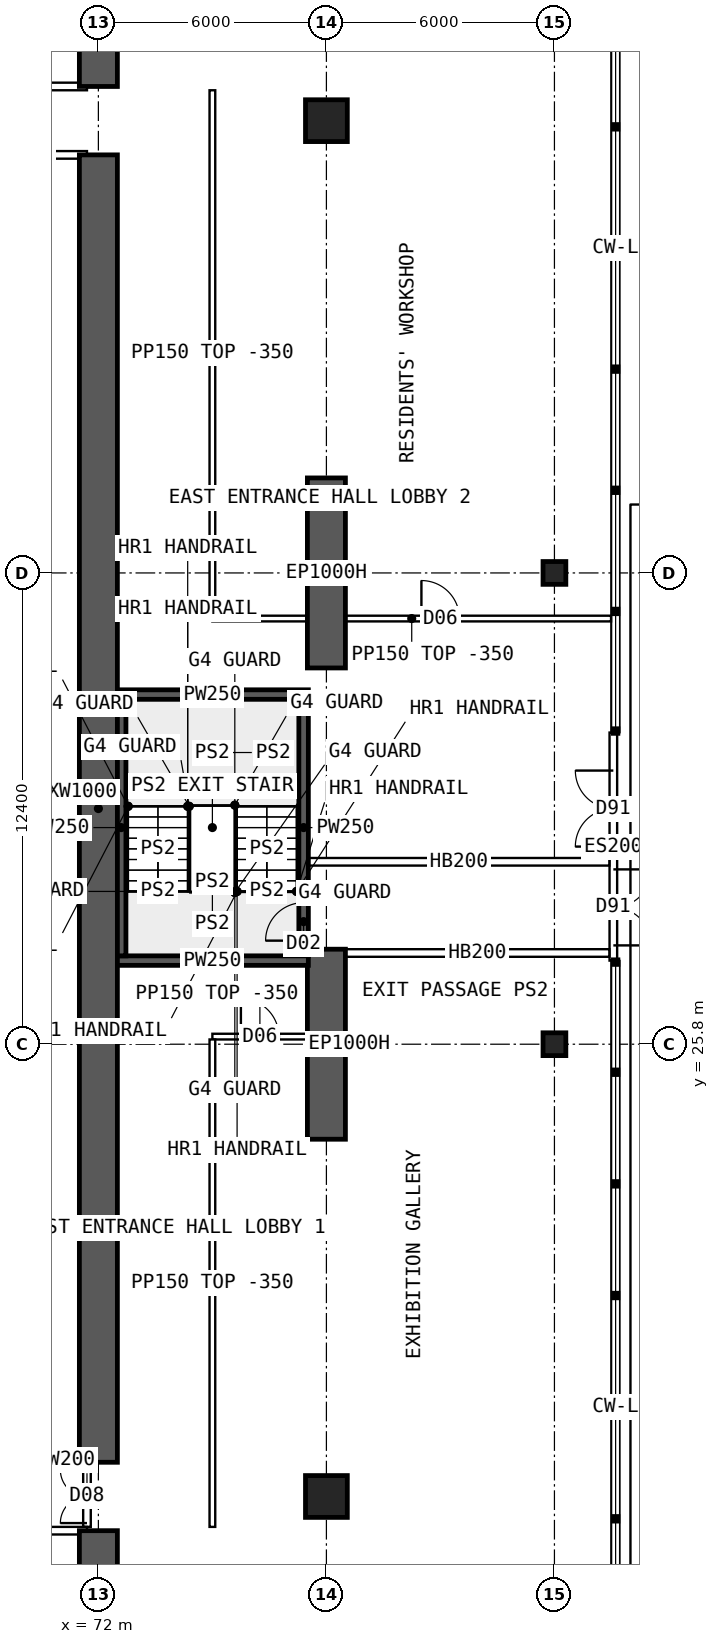
"""IFC4 building model, lengths in metres.
Left out: names, types, materials, properties, quantities, classifications, styles, units other than length and angle.
Written with IfcOpenShell. Run it as: python <this file> out.ifc"""

import sys

from ifc_helpers import new_model, si_unit, direction, frame, frame_2d, origin, origin_2d, place, context, subcontext, project, spatial, polyline, rectangle, hollow_rectangle, outline, extrude, element, fill, save


model = new_model("IFC4")
c1 = context("Model", 3, precision=1e-05, world=origin(), true_north=direction((0.0, 1.0)))
c2 = subcontext(c1, "Body", "Model", "MODEL_VIEW")
j1 = project(units=[si_unit("LENGTHUNIT", "METRE"), si_unit("PLANEANGLEUNIT", "RADIAN")], contexts=[c1])
p1 = place(None, origin())
s1 = spatial("IfcSite", under=j1, at=p1, CompositionType="ELEMENT")
p2 = place(p1, origin())
s2 = spatial("IfcBuilding", under=s1, at=p2, CompositionType="ELEMENT")
p3 = place(p2, origin())
s3 = spatial("IfcBuildingStorey", under=s2, at=p3, CompositionType="ELEMENT", Elevation=0.0)
for number, where, z_axis, x_axis in (
    (1, (78.0, 23.3, 0.0), (0.0, 0.0, 1.0), (0.0, 1.0, 0.0)),
    (2, (78.0, 35.7, 0.0), (0.0, 0.0, 1.0), (0.0, 1.0, 0.0)),
):
    element("IfcWall", number, at=place(p3, frame(where, z_axis=z_axis, x_axis=x_axis)), inside=s3, PredefinedType="SHEAR", context=c2, shape_type="SweptSolid", body=[
        extrude(rectangle(XDim=5.0, YDim=1.0, at=frame_2d((2.5, 0.0))), origin(), (0.0, 0.0, 1.0), 6.0),
    ])
for number, where, z_axis, x_axis in (
    (3, (78.0, 13.9, 0.0), (0.0, 0.0, 1.0), (1.0, 0.0, 0.0)),
    (4, (78.0, 50.1, 0.0), (0.0, 0.0, 1.0), (1.0, 0.0, 0.0)),
):
    element("IfcColumn", number, at=place(p3, frame(where, z_axis=z_axis, x_axis=x_axis)), inside=s3, PredefinedType="COLUMN", context=c2, shape_type="SweptSolid", body=[
        extrude(hollow_rectangle(XDim=1.1, YDim=1.1, WallThickness=0.11, at=origin_2d()), origin(), (0.0, 0.0, 1.0), 6.0),
    ])
for number, where, z_axis, x_axis in (
    (5, (84.0, 25.8, 0.0), (0.0, 0.0, 1.0), (1.0, 0.0, 0.0)),
    (6, (84.0, 38.2, 0.0), (0.0, 0.0, 1.0), (1.0, 0.0, 0.0)),
):
    element("IfcColumn", number, at=place(p3, frame(where, z_axis=z_axis, x_axis=x_axis)), inside=s3, PredefinedType="COLUMN", context=c2, shape_type="SweptSolid", body=[
        extrude(hollow_rectangle(XDim=0.6, YDim=0.6, WallThickness=0.06, at=origin_2d()), origin(), (0.0, 0.0, 1.0), 6.0),
    ])
p4 = place(p3, frame((72.475, 28.0, 0.0), z_axis=(0.0, 0.0, 1.0), x_axis=(1.0, 0.0, 0.0)))
e7 = element("IfcWall", 7, at=p4, inside=s3, PredefinedType="SHEAR", context=c2, shape_type="SweptSolid", body=[
    extrude(rectangle(XDim=5.05, YDim=0.25, at=frame_2d((2.525, 0.0))), origin(), (0.0, 0.0, 1.0), 6.0),
])
p5 = place(p3, frame((77.4, 28.125, 0.0), z_axis=(0.0, 0.0, 1.0), x_axis=(0.0, 1.0, 0.0)))
e8 = element("IfcWall", 8, at=p5, inside=s3, PredefinedType="SHEAR", context=c2, shape_type="SweptSolid", body=[
    extrude(rectangle(XDim=6.75, YDim=0.25, at=frame_2d((3.375, 0.0))), origin(), (0.0, 0.0, 1.0), 6.0),
])
p6 = place(p5, frame((0.4, 0.0, 0.0)))
e9 = element("IfcOpeningElement", 9, at=p6, cuts=e8, PredefinedType="OPENING", context=c2, shape_type="SweptSolid", body=[
    extrude(rectangle(XDim=1.0, YDim=2.1, at=frame_2d((0.5, 1.05))), frame((0.0, 0.135, 0.0), z_axis=(0.0, -1.0, 0.0), x_axis=(1.0, 0.0, 0.0)), (0.0, 0.0, 1.0), 0.27),
])
p7 = place(p3, frame((77.525, 35.0, 0.0), z_axis=(0.0, 0.0, 1.0), x_axis=(-1.0, 0.0, 0.0)))
e10 = element("IfcWall", 10, at=p7, inside=s3, PredefinedType="SHEAR", context=c2, shape_type="SweptSolid", body=[
    extrude(rectangle(XDim=5.05, YDim=0.25, at=frame_2d((2.525, 0.0))), origin(), (0.0, 0.0, 1.0), 6.0),
])
p8 = place(p3, frame((72.6, 34.875, 0.0), z_axis=(0.0, 0.0, 1.0), x_axis=(0.0, -1.0, 0.0)))
e11 = element("IfcWall", 11, at=p8, inside=s3, PredefinedType="SHEAR", context=c2, shape_type="SweptSolid", body=[
    extrude(rectangle(XDim=6.75, YDim=0.25, at=frame_2d((3.375, 0.0))), origin(), (0.0, 0.0, 1.0), 6.0),
])
for number, where, z_axis, x_axis in (
    (12, (72.0, 7.7, 0.0), (0.0, 0.0, 1.0), (0.0, 1.0, 0.0)),
    (13, (72.0, 51.0, 0.0), (0.0, 0.0, 1.0), (0.0, 1.0, 0.0)),
):
    element("IfcWall", number, at=place(p3, frame(where, z_axis=z_axis, x_axis=x_axis)), inside=s3, PredefinedType="SHEAR", context=c2, shape_type="SweptSolid", body=[
        extrude(rectangle(XDim=5.3, YDim=1.0, at=frame_2d((2.65, 0.0))), origin(), (0.0, 0.0, 1.0), 6.0),
    ])
p9 = place(p3, frame((72.0, 14.8, 0.0), z_axis=(0.0, 0.0, 1.0), x_axis=(0.0, 1.0, 0.0)))
e14 = element("IfcWall", 14, at=p9, inside=s3, PredefinedType="SHEAR", context=c2, shape_type="SweptSolid", body=[
    extrude(rectangle(XDim=34.4, YDim=1.0, at=frame_2d((17.2, 0.0))), origin(), (0.0, 0.0, 1.0), 6.0),
])
p10 = place(p3, frame((85.55, 28.0, 0.0), z_axis=(0.0, 0.0, 1.0), x_axis=(0.0, 1.0, 0.0)))
e15 = element("IfcWall", 15, at=p10, inside=s3, PredefinedType="SOLIDWALL", context=c2, shape_type="SweptSolid", body=[
    extrude(rectangle(XDim=6.0, YDim=0.2, at=frame_2d((3.0, 0.0))), origin(), (0.0, 0.0, 1.0), 5.65),
])
p11 = place(p10, frame((3.0, 0.0, 0.0)))
e16 = element("IfcOpeningElement", 16, at=p11, cuts=e15, PredefinedType="OPENING", context=c2, shape_type="SweptSolid", body=[
    extrude(rectangle(XDim=2.0, YDim=2.4, at=frame_2d((1.0, 1.2))), frame((0.0, 0.11, 0.0), z_axis=(0.0, -1.0, 0.0), x_axis=(1.0, 0.0, 0.0)), (0.0, 0.0, 1.0), 0.22),
])
p12 = place(p10, frame((0.4, 0.0, 0.0)))
e17 = element("IfcOpeningElement", 17, at=p12, cuts=e15, PredefinedType="OPENING", context=c2, shape_type="SweptSolid", body=[
    extrude(rectangle(XDim=2.0, YDim=2.4, at=frame_2d((1.0, 1.2))), frame((0.0, 0.11, 0.0), z_axis=(0.0, -1.0, 0.0), x_axis=(1.0, 0.0, 0.0)), (0.0, 0.0, 1.0), 0.22),
])
for number, where, z_axis, x_axis in (
    (18, (66.5, 13.0, 0.0), (0.0, 0.0, 1.0), (1.0, 0.0, 0.0)),
    (19, (66.5, 51.0, 0.0), (0.0, 0.0, 1.0), (1.0, 0.0, 0.0)),
):
    element("IfcWall", number, at=place(p3, frame(where, z_axis=z_axis, x_axis=x_axis)), inside=s3, PredefinedType="SOLIDWALL", context=c2, shape_type="SweptSolid", body=[
        extrude(rectangle(XDim=5.2, YDim=0.2, at=frame_2d((2.6, 0.0))), origin(), (0.0, 0.0, 1.0), 5.65),
    ])
for number, where, z_axis, x_axis in (
    (20, (68.4, 14.8, 0.0), (0.0, 0.0, 1.0), (1.0, 0.0, 0.0)),
    (21, (68.4, 49.2, 0.0), (0.0, 0.0, 1.0), (1.0, 0.0, 0.0)),
):
    element("IfcWall", number, at=place(p3, frame(where, z_axis=z_axis, x_axis=x_axis)), inside=s3, PredefinedType="SOLIDWALL", context=c2, shape_type="SweptSolid", body=[
        extrude(rectangle(XDim=3.3, YDim=0.2, at=frame_2d((1.65, 0.0))), origin(), (0.0, 0.0, 1.0), 5.65),
    ])
p13 = place(p3, frame((78.5, 28.2, 0.0), z_axis=(0.0, 0.0, 1.0), x_axis=(1.0, 0.0, 0.0)))
e22 = element("IfcWall", 22, at=p13, inside=s3, PredefinedType="SOLIDWALL", context=c2, shape_type="SweptSolid", body=[
    extrude(outline(polyline([(0.0, 0.0), (6.945, 0.0), (6.945, 5.65), (5.802, 5.65), (5.8, 5.05), (5.202, 5.05), (5.2, 5.65), (0.0, 5.65), (0.0, 0.0)])), frame((0.0, 0.1, 0.0), z_axis=(0.0, -1.0, 0.0), x_axis=(1.0, 0.0, 0.0)), (0.0, 0.0, 1.0), 0.2),
])
p14 = place(p3, frame((77.525, 30.6, 0.0), z_axis=(0.0, 0.0, 1.0), x_axis=(1.0, 0.0, 0.0)))
e23 = element("IfcWall", 23, at=p14, inside=s3, PredefinedType="SOLIDWALL", context=c2, shape_type="SweptSolid", body=[
    extrude(outline(polyline([(0.0, 0.0), (7.92, 0.0), (7.92, 5.65), (6.777, 5.65), (6.775, 5.05), (6.177, 5.05), (6.175, 5.65), (0.777, 5.65), (0.775, 5.05), (0.177, 5.05), (0.175, 5.65), (0.0, 5.65), (0.0, 0.0)])), frame((0.0, 0.1, 0.0), z_axis=(0.0, -1.0, 0.0), x_axis=(1.0, 0.0, 0.0)), (0.0, 0.0, 1.0), 0.2),
])
p15 = place(p3, frame((75.0, 26.0, 0.0), z_axis=(0.0, 0.0, 1.0), x_axis=(1.0, 0.0, 0.0)))
e24 = element("IfcWall", 24, at=p15, inside=s3, PredefinedType="PARTITIONING", context=c2, shape_type="SweptSolid", body=[
    extrude(rectangle(XDim=2.5, YDim=0.15, at=frame_2d((1.25, 0.0))), origin(), (0.0, 0.0, 1.0), 5.65),
])
p16 = place(p15, frame((0.75, 0.0, 0.0)))
e25 = element("IfcOpeningElement", 25, at=p16, cuts=e24, PredefinedType="OPENING", context=c2, shape_type="SweptSolid", body=[
    extrude(rectangle(XDim=1.0, YDim=2.1, at=frame_2d((0.5, 1.05))), frame((0.0, 0.085, 0.0), z_axis=(0.0, -1.0, 0.0), x_axis=(1.0, 0.0, 0.0)), (0.0, 0.0, 1.0), 0.17),
])
p17 = place(p3, frame((75.0, 37.0, 0.0), z_axis=(0.0, 0.0, 1.0), x_axis=(1.0, 0.0, 0.0)))
e26 = element("IfcWall", 26, at=p17, inside=s3, PredefinedType="PARTITIONING", context=c2, shape_type="SweptSolid", body=[
    extrude(outline(polyline([(0.0, 0.0), (10.49, 0.0), (10.49, 5.65), (9.302, 5.65), (9.3, 5.05), (8.702, 5.05), (8.7, 5.65), (0.0, 5.65), (0.0, 0.0)])), frame((0.0, 0.075, 0.0), z_axis=(0.0, -1.0, 0.0), x_axis=(1.0, 0.0, 0.0)), (0.0, 0.0, 1.0), 0.15),
])
p18 = place(p17, frame((5.5, 0.0, 0.0)))
e27 = element("IfcOpeningElement", 27, at=p18, cuts=e26, PredefinedType="OPENING", context=c2, shape_type="SweptSolid", body=[
    extrude(rectangle(XDim=1.0, YDim=2.1, at=frame_2d((0.5, 1.05))), frame((0.0, 0.085, 0.0), z_axis=(0.0, -1.0, 0.0), x_axis=(1.0, 0.0, 0.0)), (0.0, 0.0, 1.0), 0.17),
])
p19 = place(p3, frame((75.0, 13.1, 0.0), z_axis=(0.0, 0.0, 1.0), x_axis=(0.0, 1.0, 0.0)))
e28 = element("IfcWall", 28, at=p19, inside=s3, PredefinedType="PARTITIONING", context=c2, shape_type="SweptSolid", body=[
    extrude(rectangle(XDim=12.825, YDim=0.15, at=frame_2d((6.413, 0.0))), origin(), (0.0, 0.0, 1.0), 5.65),
])
p20 = place(p3, frame((75.0, 37.075, 0.0), z_axis=(0.0, 0.0, 1.0), x_axis=(0.0, 1.0, 0.0)))
e29 = element("IfcWall", 29, at=p20, inside=s3, PredefinedType="PARTITIONING", context=c2, shape_type="SweptSolid", body=[
    extrude(rectangle(XDim=13.825, YDim=0.15, at=frame_2d((6.913, 0.0))), origin(), (0.0, 0.0, 1.0), 5.65),
])
p21 = place(p3, frame((71.7, 13.1, 0.0), z_axis=(0.0, 0.0, 1.0), x_axis=(0.0, 1.0, 0.0)))
e30 = element("IfcWall", 30, at=p21, inside=s3, PredefinedType="SOLIDWALL", context=c2, shape_type="SweptSolid", body=[
    extrude(rectangle(XDim=1.6, YDim=0.2, at=frame_2d((0.8, 0.0))), origin(), (0.0, 0.0, 1.0), 5.65),
])
p22 = place(p21, frame((0.1, 0.0, 0.0)))
e31 = element("IfcOpeningElement", 31, at=p22, cuts=e30, PredefinedType="OPENING", context=c2, shape_type="SweptSolid", body=[
    extrude(rectangle(XDim=1.4, YDim=2.1, at=frame_2d((0.7, 1.05))), frame((0.0, 0.11, 0.0), z_axis=(0.0, -1.0, 0.0), x_axis=(1.0, 0.0, 0.0)), (0.0, 0.0, 1.0), 0.22),
])
p23 = place(p11, origin())
e32 = element("IfcDoor", 32, at=p23, inside=s3, OperationType="DOUBLE_DOOR_SINGLE_SWING", PredefinedType="DOOR", context=c2, shape_type="SweptSolid", body=[
    extrude(rectangle(XDim=2.0, YDim=2.4, at=frame_2d((1.0, 1.2))), frame((0.0, 0.025, 0.0), z_axis=(0.0, -1.0, 0.0), x_axis=(1.0, 0.0, 0.0)), (0.0, 0.0, 1.0), 0.05),
])
fill(e16, e32)
p24 = place(p12, frame((2.0, 0.0, 0.0), z_axis=(0.0, 0.0, 1.0), x_axis=(-1.0, 0.0, 0.0)))
e33 = element("IfcDoor", 33, at=p24, inside=s3, OperationType="DOUBLE_DOOR_SINGLE_SWING", PredefinedType="DOOR", context=c2, shape_type="SweptSolid", body=[
    extrude(rectangle(XDim=2.0, YDim=2.4, at=frame_2d((1.0, 1.2))), frame((0.0, 0.025, 0.0), z_axis=(0.0, -1.0, 0.0), x_axis=(1.0, 0.0, 0.0)), (0.0, 0.0, 1.0), 0.05),
])
fill(e17, e33)
p25 = place(p6, origin())
e34 = element("IfcDoor", 34, at=p25, inside=s3, OperationType="SINGLE_SWING_LEFT", PredefinedType="DOOR", context=c2, shape_type="SweptSolid", body=[
    extrude(rectangle(XDim=1.0, YDim=2.1, at=frame_2d((0.5, 1.05))), frame((0.0, 0.025, 0.0), z_axis=(0.0, -1.0, 0.0), x_axis=(1.0, 0.0, 0.0)), (0.0, 0.0, 1.0), 0.05),
])
fill(e9, e34)
p26 = place(p16, origin())
e35 = element("IfcDoor", 35, at=p26, inside=s3, OperationType="SINGLE_SWING_LEFT", PredefinedType="DOOR", context=c2, shape_type="SweptSolid", body=[
    extrude(rectangle(XDim=1.0, YDim=2.1, at=frame_2d((0.5, 1.05))), frame((0.0, 0.025, 0.0), z_axis=(0.0, -1.0, 0.0), x_axis=(1.0, 0.0, 0.0)), (0.0, 0.0, 1.0), 0.05),
])
fill(e25, e35)
p27 = place(p18, origin())
e36 = element("IfcDoor", 36, at=p27, inside=s3, OperationType="SINGLE_SWING_LEFT", PredefinedType="DOOR", context=c2, shape_type="SweptSolid", body=[
    extrude(rectangle(XDim=1.0, YDim=2.1, at=frame_2d((0.5, 1.05))), frame((0.0, 0.025, 0.0), z_axis=(0.0, -1.0, 0.0), x_axis=(1.0, 0.0, 0.0)), (0.0, 0.0, 1.0), 0.05),
])
fill(e27, e36)
p28 = place(p22, origin())
e37 = element("IfcDoor", 37, at=p28, inside=s3, OperationType="DOUBLE_DOOR_SINGLE_SWING", PredefinedType="DOOR", context=c2, shape_type="SweptSolid", body=[
    extrude(rectangle(XDim=1.4, YDim=2.1, at=frame_2d((0.7, 1.05))), frame((0.0, 0.025, 0.0), z_axis=(0.0, -1.0, 0.0), x_axis=(1.0, 0.0, 0.0)), (0.0, 0.0, 1.0), 0.05),
])
fill(e31, e37)
save(model, sys.argv[1])
